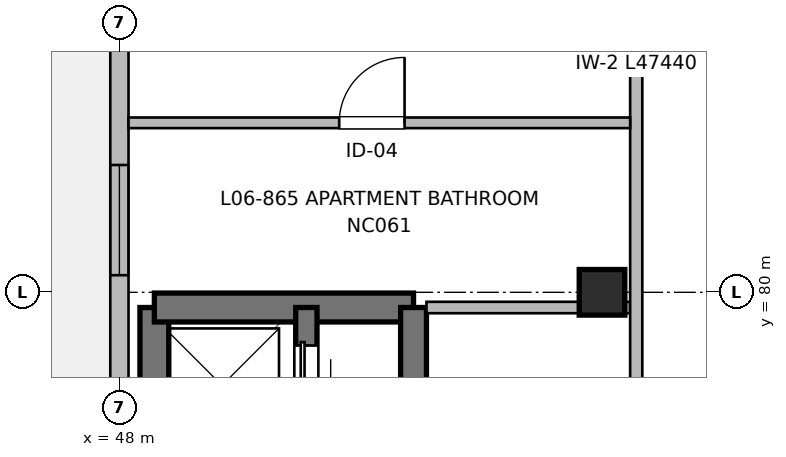
"""IFC4 building model, lengths in metres.
Left out: names, types, materials, properties, quantities, classifications, styles, units other than length and angle.
Written with IfcOpenShell. Run it as: python <this file> out.ifc"""

import sys

from ifc_helpers import new_model, si_unit, direction, frame, frame_2d, origin, origin_2d, place, context, subcontext, project, spatial, rectangle, extrude, element, fill, save


model = new_model("IFC4")
c1 = context("Model", 3, precision=1e-05, world=origin(), true_north=direction((0.0, 1.0)))
c2 = subcontext(c1, "Body", "Model", "MODEL_VIEW")
j1 = project(units=[si_unit("LENGTHUNIT", "METRE"), si_unit("PLANEANGLEUNIT", "RADIAN")], contexts=[c1])
p1 = place(None, origin())
s1 = spatial("IfcSite", under=j1, at=p1, CompositionType="ELEMENT")
p2 = place(p1, origin())
s2 = spatial("IfcBuilding", under=s1, at=p2, CompositionType="ELEMENT")
p3 = place(p2, frame((0.0, 0.0, 20.16)))
s3 = spatial("IfcBuildingStorey", under=s2, at=p3, CompositionType="ELEMENT", Elevation=20.16)
p4 = place(p3, frame((54.35, 80.0, 0.0), z_axis=(0.0, 0.0, 1.0), x_axis=(1.0, 0.0, 0.0)))
e1 = element("IfcColumn", 1, at=p4, inside=s3, PredefinedType="COLUMN", context=c2, shape_type="SweptSolid", body=[
    extrude(rectangle(XDim=0.6, YDim=0.6, at=origin_2d()), origin(), (0.0, 0.0, 1.0), 3.2),
])
p5 = place(p3, frame((48.46, 67.35, 0.0), z_axis=(0.0, 0.0, 1.0), x_axis=(0.0, 1.0, 0.0)))
e2 = element("IfcWall", 2, at=p5, inside=s3, PredefinedType="SHEAR", context=c2, shape_type="SweptSolid", body=[
    extrude(rectangle(XDim=12.45, YDim=0.38, at=frame_2d((6.225, 0.0))), origin(), (0.0, 0.0, 1.0), 3.2),
])
p6 = place(p5, frame((2.2, 0.0, 0.97)))
e3 = element("IfcOpeningElement", 3, at=p6, cuts=e2, PredefinedType="OPENING", context=c2, shape_type="SweptSolid", body=[
    extrude(rectangle(XDim=0.95, YDim=1.25, at=frame_2d((0.475, 0.625))), frame((0.0, 0.2, 0.0), z_axis=(0.0, -1.0, 0.0), x_axis=(1.0, 0.0, 0.0)), (0.0, 0.0, 1.0), 0.4),
])
p7 = place(p3, frame((48.46, 79.8, 0.0), z_axis=(0.0, 0.0, 1.0), x_axis=(1.0, 0.0, 0.0)))
e4 = element("IfcWall", 4, at=p7, inside=s3, PredefinedType="SHEAR", context=c2, shape_type="SweptSolid", body=[
    extrude(rectangle(XDim=3.41, YDim=0.38, at=frame_2d((1.705, 0.0))), origin(), (0.0, 0.0, 1.0), 3.2),
])
p8 = place(p3, frame((51.87, 79.8, 0.0), z_axis=(0.0, 0.0, 1.0), x_axis=(0.0, -1.0, 0.0)))
e5 = element("IfcWall", 5, at=p8, inside=s3, PredefinedType="SHEAR", context=c2, shape_type="SweptSolid", body=[
    extrude(rectangle(XDim=12.45, YDim=0.34, at=frame_2d((6.225, 0.0))), origin(), (0.0, 0.0, 1.0), 3.2),
])
p9 = place(p8, frame((10.85, 0.0, 0.0)))
e6 = element("IfcOpeningElement", 6, at=p9, cuts=e5, PredefinedType="OPENING", context=c2, shape_type="SweptSolid", body=[
    extrude(rectangle(XDim=1.05, YDim=2.15, at=frame_2d((0.525, 1.075))), frame((0.0, 0.18, 0.0), z_axis=(0.0, -1.0, 0.0), x_axis=(1.0, 0.0, 0.0)), (0.0, 0.0, 1.0), 0.36),
])
p10 = place(p3, frame((50.46, 74.55, 0.0), z_axis=(0.0, 0.0, 1.0), x_axis=(0.0, 1.0, 0.0)))
e7 = element("IfcWall", 7, at=p10, inside=s3, PredefinedType="SHEAR", context=c2, shape_type="SweptSolid", body=[
    extrude(rectangle(XDim=5.25, YDim=0.28, at=frame_2d((2.625, 0.0))), origin(), (0.0, 0.0, 1.0), 3.2),
])
p11 = place(p10, frame((1.15, 0.0, 0.0)))
e8 = element("IfcOpeningElement", 8, at=p11, cuts=e7, PredefinedType="OPENING", context=c2, shape_type="SweptSolid", body=[
    extrude(rectangle(XDim=1.0, YDim=2.15, at=frame_2d((0.5, 1.075))), frame((0.0, 0.15, 0.0), z_axis=(0.0, -1.0, 0.0), x_axis=(1.0, 0.0, 0.0)), (0.0, 0.0, 1.0), 0.3),
])
p12 = place(p10, frame((3.85, 0.0, 0.0)))
e9 = element("IfcOpeningElement", 9, at=p12, cuts=e7, PredefinedType="OPENING", context=c2, shape_type="SweptSolid", body=[
    extrude(rectangle(XDim=0.9, YDim=2.15, at=frame_2d((0.45, 1.075))), frame((0.0, 0.15, 0.0), z_axis=(0.0, -1.0, 0.0), x_axis=(1.0, 0.0, 0.0)), (0.0, 0.0, 1.0), 0.3),
])
p13 = place(p3, frame((48.0, 59.2, 0.0), z_axis=(0.0, 0.0, 1.0), x_axis=(0.0, 1.0, 0.0)))
e10 = element("IfcWall", 10, at=p13, inside=s3, PredefinedType="SOLIDWALL", context=c2, shape_type="SweptSolid", body=[
    extrude(rectangle(XDim=34.8, YDim=0.24, at=frame_2d((17.4, 0.0))), origin(), (0.0, 0.0, 1.0), 2.98),
])
p14 = place(p13, frame((2.55, 0.0, 0.0)))
e11 = element("IfcOpeningElement", 11, at=p14, cuts=e10, PredefinedType="OPENING", context=c2, shape_type="SweptSolid", body=[
    extrude(rectangle(XDim=1.2, YDim=2.2, at=frame_2d((0.6, 1.1))), frame((0.0, 0.13, 0.0), z_axis=(0.0, -1.0, 0.0), x_axis=(1.0, 0.0, 0.0)), (0.0, 0.0, 1.0), 0.26),
])
p15 = place(p13, frame((5.65, 0.0, 0.77)))
e12 = element("IfcOpeningElement", 12, at=p15, cuts=e10, PredefinedType="OPENING", context=c2, shape_type="SweptSolid", body=[
    extrude(rectangle(XDim=1.65, YDim=1.45, at=frame_2d((0.825, 0.725))), frame((0.0, 0.13, 0.0), z_axis=(0.0, -1.0, 0.0), x_axis=(1.0, 0.0, 0.0)), (0.0, 0.0, 1.0), 0.26),
])
p16 = place(p13, frame((11.9, 0.0, 0.57)))
e13 = element("IfcOpeningElement", 13, at=p16, cuts=e10, PredefinedType="OPENING", context=c2, shape_type="SweptSolid", body=[
    extrude(rectangle(XDim=2.3, YDim=1.65, at=frame_2d((1.15, 0.825))), frame((0.0, 0.13, 0.0), z_axis=(0.0, -1.0, 0.0), x_axis=(1.0, 0.0, 0.0)), (0.0, 0.0, 1.0), 0.26),
])
p17 = place(p13, frame((21.025, 0.0, 0.77)))
e14 = element("IfcOpeningElement", 14, at=p17, cuts=e10, PredefinedType="OPENING", context=c2, shape_type="SweptSolid", body=[
    extrude(rectangle(XDim=1.45, YDim=1.45, at=frame_2d((0.725, 0.725))), frame((0.0, 0.13, 0.0), z_axis=(0.0, -1.0, 0.0), x_axis=(1.0, 0.0, 0.0)), (0.0, 0.0, 1.0), 0.26),
])
p18 = place(p13, frame((29.475, 0.0, 0.72)))
e15 = element("IfcOpeningElement", 15, at=p18, cuts=e10, PredefinedType="OPENING", context=c2, shape_type="SweptSolid", body=[
    extrude(rectangle(XDim=1.95, YDim=1.5, at=frame_2d((0.975, 0.75))), frame((0.0, 0.13, 0.0), z_axis=(0.0, -1.0, 0.0), x_axis=(1.0, 0.0, 0.0)), (0.0, 0.0, 1.0), 0.26),
])
p19 = place(p3, frame((52.04, 79.8, 0.0), z_axis=(0.0, 0.0, 1.0), x_axis=(1.0, 0.0, 0.0)))
e16 = element("IfcWall", 16, at=p19, inside=s3, PredefinedType="PARTITIONING", context=c2, shape_type="SweptSolid", body=[
    extrude(rectangle(XDim=2.68, YDim=0.15, at=frame_2d((1.34, 0.0))), origin(), (0.0, 0.0, 1.0), 2.935),
])
p20 = place(p3, frame((54.8, 59.36, 0.0), z_axis=(0.0, 0.0, 1.0), x_axis=(0.0, 1.0, 0.0)))
e17 = element("IfcWall", 17, at=p20, inside=s3, PredefinedType="PARTITIONING", context=c2, shape_type="SweptSolid", body=[
    extrude(rectangle(XDim=47.44, YDim=0.16, at=frame_2d((23.72, 0.0))), origin(), (0.0, 0.0, 1.0), 2.935),
])
p21 = place(p20, frame((9.64, 0.0, 0.0)))
e18 = element("IfcOpeningElement", 18, at=p21, cuts=e17, PredefinedType="OPENING", context=c2, shape_type="SweptSolid", body=[
    extrude(rectangle(XDim=1.1, YDim=2.15, at=frame_2d((0.55, 1.075))), frame((0.0, 0.09, 0.0), z_axis=(0.0, -1.0, 0.0), x_axis=(1.0, 0.0, 0.0)), (0.0, 0.0, 1.0), 0.18),
])
p22 = place(p20, frame((16.04, 0.0, 0.0)))
e19 = element("IfcOpeningElement", 19, at=p22, cuts=e17, PredefinedType="OPENING", context=c2, shape_type="SweptSolid", body=[
    extrude(rectangle(XDim=1.6, YDim=2.15, at=frame_2d((0.8, 1.075))), frame((0.0, 0.09, 0.0), z_axis=(0.0, -1.0, 0.0), x_axis=(1.0, 0.0, 0.0)), (0.0, 0.0, 1.0), 0.18),
])
p23 = place(p20, frame((1.8, 0.0, 0.0)))
e20 = element("IfcOpeningElement", 20, at=p23, cuts=e17, PredefinedType="OPENING", context=c2, shape_type="SweptSolid", body=[
    extrude(rectangle(XDim=0.96, YDim=2.15, at=frame_2d((0.48, 1.075))), frame((0.0, 0.09, 0.0), z_axis=(0.0, -1.0, 0.0), x_axis=(1.0, 0.0, 0.0)), (0.0, 0.0, 1.0), 0.18),
])
p24 = place(p20, frame((29.645, 0.0, 0.0)))
e21 = element("IfcOpeningElement", 21, at=p24, cuts=e17, PredefinedType="OPENING", context=c2, shape_type="SweptSolid", body=[
    extrude(rectangle(XDim=0.98, YDim=2.15, at=frame_2d((0.49, 1.075))), frame((0.0, 0.09, 0.0), z_axis=(0.0, -1.0, 0.0), x_axis=(1.0, 0.0, 0.0)), (0.0, 0.0, 1.0), 0.18),
])
p25 = place(p20, frame((37.455, 0.0, 0.0)))
e22 = element("IfcOpeningElement", 22, at=p25, cuts=e17, PredefinedType="OPENING", context=c2, shape_type="SweptSolid", body=[
    extrude(rectangle(XDim=0.98, YDim=2.15, at=frame_2d((0.49, 1.075))), frame((0.0, 0.09, 0.0), z_axis=(0.0, -1.0, 0.0), x_axis=(1.0, 0.0, 0.0)), (0.0, 0.0, 1.0), 0.18),
])
p26 = place(p3, frame((48.12, 82.23, 0.0), z_axis=(0.0, 0.0, 1.0), x_axis=(1.0, 0.0, 0.0)))
e23 = element("IfcWall", 23, at=p26, inside=s3, PredefinedType="PARTITIONING", context=c2, shape_type="SweptSolid", body=[
    extrude(rectangle(XDim=6.6, YDim=0.14, at=frame_2d((3.3, 0.0))), origin(), (0.0, 0.0, 1.0), 2.935),
])
p27 = place(p26, frame((2.772, 0.0, 0.0)))
e24 = element("IfcOpeningElement", 24, at=p27, cuts=e23, PredefinedType="OPENING", context=c2, shape_type="SweptSolid", body=[
    extrude(rectangle(XDim=0.86, YDim=2.1, at=frame_2d((0.43, 1.05))), frame((0.0, 0.08, 0.0), z_axis=(0.0, -1.0, 0.0), x_axis=(1.0, 0.0, 0.0)), (0.0, 0.0, 1.0), 0.16),
])
p28 = place(p12, origin())
e25 = element("IfcDoor", 25, at=p28, inside=s3, OperationType="SLIDING_TO_RIGHT", PredefinedType="DOOR", context=c2, shape_type="SweptSolid", body=[
    extrude(rectangle(XDim=0.9, YDim=2.15, at=frame_2d((0.45, 1.075))), frame((0.0, 0.025, 0.0), z_axis=(0.0, -1.0, 0.0), x_axis=(1.0, 0.0, 0.0)), (0.0, 0.0, 1.0), 0.05),
])
fill(e9, e25)
p29 = place(p17, origin())
e26 = element("IfcWindow", 26, at=p29, inside=s3, PartitioningType="SINGLE_PANEL", PredefinedType="WINDOW", context=c2, shape_type="SweptSolid", body=[
    extrude(rectangle(XDim=1.45, YDim=1.45, at=frame_2d((0.725, 0.725))), frame((0.0, 0.03, 0.0), z_axis=(0.0, -1.0, 0.0), x_axis=(1.0, 0.0, 0.0)), (0.0, 0.0, 1.0), 0.06),
])
fill(e14, e26)
p30 = place(p27, origin())
e27 = element("IfcDoor", 27, at=p30, inside=s3, OperationType="SINGLE_SWING_RIGHT", PredefinedType="DOOR", context=c2, shape_type="SweptSolid", body=[
    extrude(rectangle(XDim=0.86, YDim=2.1, at=frame_2d((0.43, 1.05))), frame((0.0, 0.025, 0.0), z_axis=(0.0, -1.0, 0.0), x_axis=(1.0, 0.0, 0.0)), (0.0, 0.0, 1.0), 0.05),
])
fill(e24, e27)
save(model, sys.argv[1])
